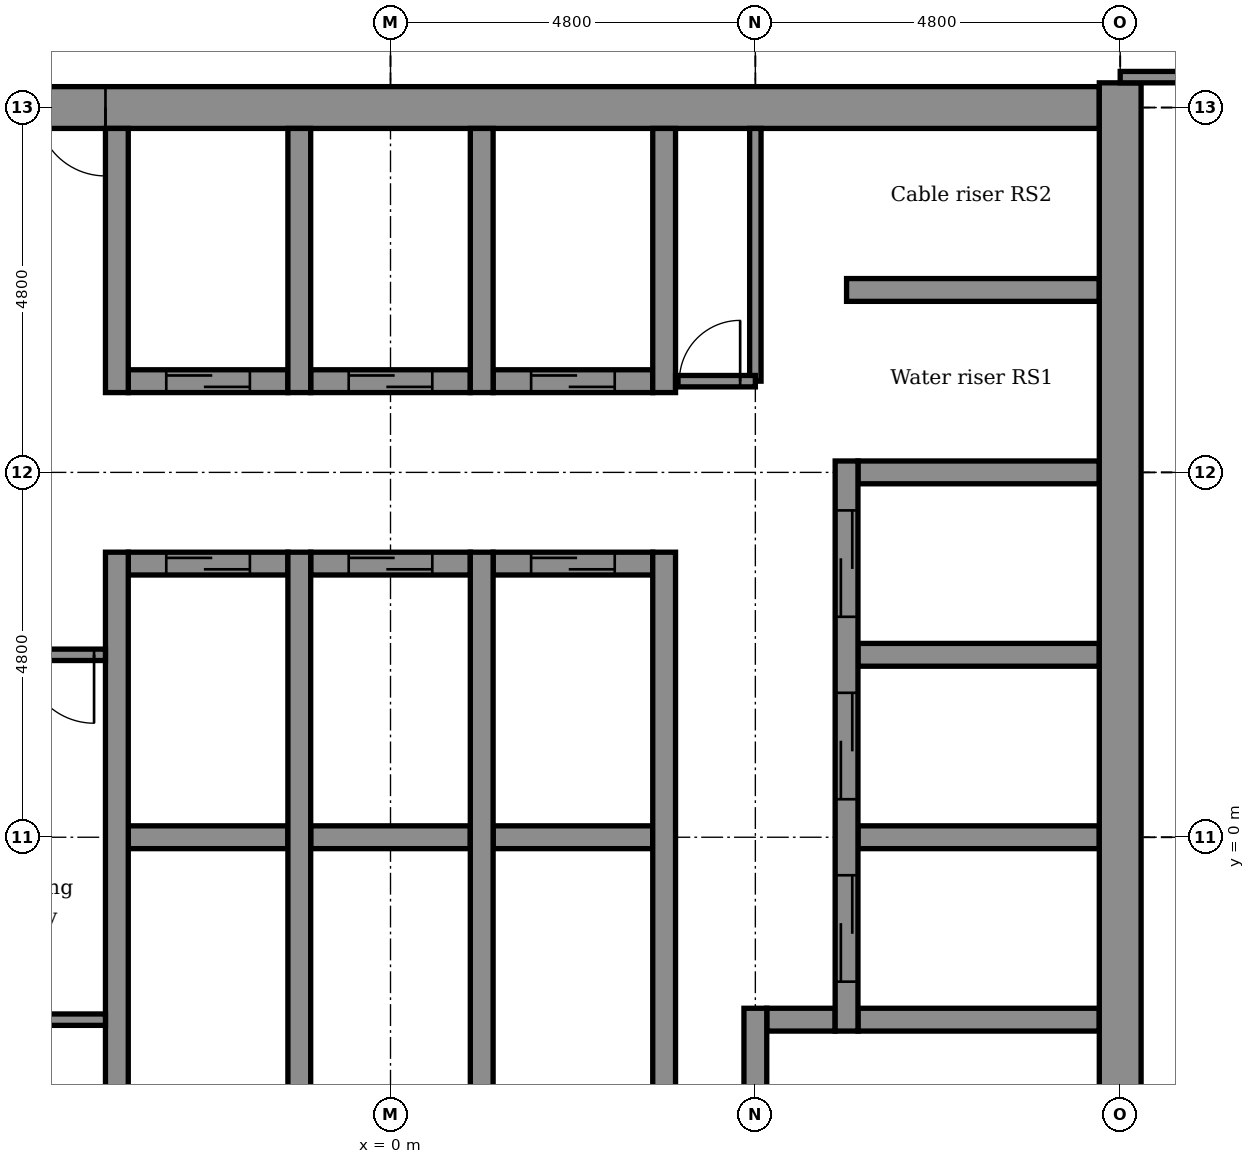
"""IFC4 building model, lengths in metres.
Left out: names, types, materials, properties, quantities, classifications, styles, units other than length and angle.
Written with IfcOpenShell. Run it as: python <this file> out.ifc"""

import sys

from ifc_helpers import new_model, si_unit, direction, frame, frame_2d, origin, place, context, subcontext, project, spatial, rectangle, extrude, element, fill, save


model = new_model("IFC4")
c1 = context("Model", 3, precision=1e-05, world=origin(), true_north=direction((0.0, 1.0)))
c2 = subcontext(c1, "Body", "Model", "MODEL_VIEW")
j1 = project(units=[si_unit("LENGTHUNIT", "METRE"), si_unit("PLANEANGLEUNIT", "RADIAN")], contexts=[c1])
p1 = place(None, origin())
s1 = spatial("IfcSite", under=j1, at=p1, CompositionType="ELEMENT")
p2 = place(p1, origin())
s2 = spatial("IfcBuilding", under=s1, at=p2, CompositionType="ELEMENT")
p3 = place(p2, frame((0.0, 0.0, 222.8)))
s3 = spatial("IfcBuildingStorey", under=s2, at=p3, CompositionType="ELEMENT", Elevation=222.8)
p4 = place(p3, frame((4.95, -2.4, -0.15), z_axis=(0.0, 0.0, 1.0), x_axis=(1.0, 0.0, 0.0)))
e1 = element("IfcWall", 1, at=p4, inside=s3, PredefinedType="STANDARD", context=c2, shape_type="SweptSolid", body=[
    extrude(rectangle(XDim=0.9, YDim=0.3, at=frame_2d((0.45, 0.0))), origin(), (0.0, 0.0, 1.0), 3.9),
])
p5 = place(p3, frame((6.15, -2.4, -0.15), z_axis=(0.0, 0.0, 1.0), x_axis=(1.0, 0.0, 0.0)))
e2 = element("IfcWall", 2, at=p5, inside=s3, PredefinedType="STANDARD", context=c2, shape_type="SweptSolid", body=[
    extrude(rectangle(XDim=3.175, YDim=0.3, at=frame_2d((1.587, 0.0))), origin(), (0.0, 0.0, 1.0), 3.9),
])
p6 = place(p3, frame((-3.45, 0.0, -0.15), z_axis=(0.0, 0.0, 1.0), x_axis=(1.0, 0.0, 0.0)))
e3 = element("IfcWall", 3, at=p6, inside=s3, PredefinedType="STANDARD", context=c2, shape_type="SweptSolid", body=[
    extrude(rectangle(XDim=2.1, YDim=0.3, at=frame_2d((1.05, 0.0))), origin(), (0.0, 0.0, 1.0), 3.9),
])
p7 = place(p3, frame((-1.05, 0.0, -0.15), z_axis=(0.0, 0.0, 1.0), x_axis=(1.0, 0.0, 0.0)))
e4 = element("IfcWall", 4, at=p7, inside=s3, PredefinedType="STANDARD", context=c2, shape_type="SweptSolid", body=[
    extrude(rectangle(XDim=2.1, YDim=0.3, at=frame_2d((1.05, 0.0))), origin(), (0.0, 0.0, 1.0), 3.9),
])
p8 = place(p3, frame((1.35, 0.0, -0.15), z_axis=(0.0, 0.0, 1.0), x_axis=(1.0, 0.0, 0.0)))
e5 = element("IfcWall", 5, at=p8, inside=s3, PredefinedType="STANDARD", context=c2, shape_type="SweptSolid", body=[
    extrude(rectangle(XDim=2.1, YDim=0.3, at=frame_2d((1.05, 0.0))), origin(), (0.0, 0.0, 1.0), 3.9),
])
for number, where, z_axis, x_axis in (
    (6, (6.15, 0.0, -0.15), (0.0, 0.0, 1.0), (1.0, 0.0, 0.0)),
    (7, (6.15, 2.4, -0.15), (0.0, 0.0, 1.0), (1.0, 0.0, 0.0)),
):
    element("IfcWall", number, at=place(p3, frame(where, z_axis=z_axis, x_axis=x_axis)), inside=s3, PredefinedType="STANDARD", context=c2, shape_type="SweptSolid", body=[
        extrude(rectangle(XDim=3.175, YDim=0.3, at=frame_2d((1.587, 0.0))), origin(), (0.0, 0.0, 1.0), 3.9),
    ])
p9 = place(p3, frame((-3.45, 3.6, -0.15), z_axis=(0.0, 0.0, 1.0), x_axis=(1.0, 0.0, 0.0)))
e8 = element("IfcWall", 8, at=p9, inside=s3, PredefinedType="STANDARD", context=c2, shape_type="SweptSolid", body=[
    extrude(rectangle(XDim=2.1, YDim=0.3, at=frame_2d((1.05, 0.0))), origin(), (0.0, 0.0, 1.0), 3.9),
])
p10 = place(p9, frame((0.5, 0.0, 0.15)))
e9 = element("IfcOpeningElement", 9, at=p10, cuts=e8, PredefinedType="OPENING", context=c2, shape_type="SweptSolid", body=[
    extrude(rectangle(XDim=1.1, YDim=2.1, at=frame_2d((0.55, 1.05))), frame((0.0, 0.16, 0.0), z_axis=(0.0, -1.0, 0.0), x_axis=(1.0, 0.0, 0.0)), (0.0, 0.0, 1.0), 0.32),
])
p11 = place(p3, frame((-1.05, 3.6, -0.15), z_axis=(0.0, 0.0, 1.0), x_axis=(1.0, 0.0, 0.0)))
e10 = element("IfcWall", 10, at=p11, inside=s3, PredefinedType="STANDARD", context=c2, shape_type="SweptSolid", body=[
    extrude(rectangle(XDim=2.1, YDim=0.3, at=frame_2d((1.05, 0.0))), origin(), (0.0, 0.0, 1.0), 3.9),
])
p12 = place(p11, frame((0.5, 0.0, 0.15)))
e11 = element("IfcOpeningElement", 11, at=p12, cuts=e10, PredefinedType="OPENING", context=c2, shape_type="SweptSolid", body=[
    extrude(rectangle(XDim=1.1, YDim=2.1, at=frame_2d((0.55, 1.05))), frame((0.0, 0.16, 0.0), z_axis=(0.0, -1.0, 0.0), x_axis=(1.0, 0.0, 0.0)), (0.0, 0.0, 1.0), 0.32),
])
p13 = place(p3, frame((1.35, 3.6, -0.15), z_axis=(0.0, 0.0, 1.0), x_axis=(1.0, 0.0, 0.0)))
e12 = element("IfcWall", 12, at=p13, inside=s3, PredefinedType="STANDARD", context=c2, shape_type="SweptSolid", body=[
    extrude(rectangle(XDim=2.1, YDim=0.3, at=frame_2d((1.05, 0.0))), origin(), (0.0, 0.0, 1.0), 3.9),
])
p14 = place(p13, frame((0.5, 0.0, 0.15)))
e13 = element("IfcOpeningElement", 13, at=p14, cuts=e12, PredefinedType="OPENING", context=c2, shape_type="SweptSolid", body=[
    extrude(rectangle(XDim=1.1, YDim=2.1, at=frame_2d((0.55, 1.05))), frame((0.0, 0.16, 0.0), z_axis=(0.0, -1.0, 0.0), x_axis=(1.0, 0.0, 0.0)), (0.0, 0.0, 1.0), 0.32),
])
p15 = place(p3, frame((6.15, 4.8, -0.15), z_axis=(0.0, 0.0, 1.0), x_axis=(1.0, 0.0, 0.0)))
e14 = element("IfcWall", 14, at=p15, inside=s3, PredefinedType="STANDARD", context=c2, shape_type="SweptSolid", body=[
    extrude(rectangle(XDim=3.175, YDim=0.3, at=frame_2d((1.587, 0.0))), origin(), (0.0, 0.0, 1.0), 3.9),
])
p16 = place(p3, frame((-3.45, 6.0, -0.15), z_axis=(0.0, 0.0, 1.0), x_axis=(1.0, 0.0, 0.0)))
e15 = element("IfcWall", 15, at=p16, inside=s3, PredefinedType="STANDARD", context=c2, shape_type="SweptSolid", body=[
    extrude(rectangle(XDim=2.1, YDim=0.3, at=frame_2d((1.05, 0.0))), origin(), (0.0, 0.0, 1.0), 3.9),
])
p17 = place(p16, frame((0.5, 0.0, 0.15)))
e16 = element("IfcOpeningElement", 16, at=p17, cuts=e15, PredefinedType="OPENING", context=c2, shape_type="SweptSolid", body=[
    extrude(rectangle(XDim=1.1, YDim=2.1, at=frame_2d((0.55, 1.05))), frame((0.0, 0.16, 0.0), z_axis=(0.0, -1.0, 0.0), x_axis=(1.0, 0.0, 0.0)), (0.0, 0.0, 1.0), 0.32),
])
p18 = place(p3, frame((-1.05, 6.0, -0.15), z_axis=(0.0, 0.0, 1.0), x_axis=(1.0, 0.0, 0.0)))
e17 = element("IfcWall", 17, at=p18, inside=s3, PredefinedType="STANDARD", context=c2, shape_type="SweptSolid", body=[
    extrude(rectangle(XDim=2.1, YDim=0.3, at=frame_2d((1.05, 0.0))), origin(), (0.0, 0.0, 1.0), 3.9),
])
p19 = place(p18, frame((0.5, 0.0, 0.15)))
e18 = element("IfcOpeningElement", 18, at=p19, cuts=e17, PredefinedType="OPENING", context=c2, shape_type="SweptSolid", body=[
    extrude(rectangle(XDim=1.1, YDim=2.1, at=frame_2d((0.55, 1.05))), frame((0.0, 0.16, 0.0), z_axis=(0.0, -1.0, 0.0), x_axis=(1.0, 0.0, 0.0)), (0.0, 0.0, 1.0), 0.32),
])
p20 = place(p3, frame((1.35, 6.0, -0.15), z_axis=(0.0, 0.0, 1.0), x_axis=(1.0, 0.0, 0.0)))
e19 = element("IfcWall", 19, at=p20, inside=s3, PredefinedType="STANDARD", context=c2, shape_type="SweptSolid", body=[
    extrude(rectangle(XDim=2.1, YDim=0.3, at=frame_2d((1.05, 0.0))), origin(), (0.0, 0.0, 1.0), 3.9),
])
p21 = place(p20, frame((0.5, 0.0, 0.15)))
e20 = element("IfcOpeningElement", 20, at=p21, cuts=e19, PredefinedType="OPENING", context=c2, shape_type="SweptSolid", body=[
    extrude(rectangle(XDim=1.1, YDim=2.1, at=frame_2d((0.55, 1.05))), frame((0.0, 0.16, 0.0), z_axis=(0.0, -1.0, 0.0), x_axis=(1.0, 0.0, 0.0)), (0.0, 0.0, 1.0), 0.32),
])
p22 = place(p3, frame((6.0, 7.2, -0.15), z_axis=(0.0, 0.0, 1.0), x_axis=(1.0, 0.0, 0.0)))
e21 = element("IfcWall", 21, at=p22, inside=s3, PredefinedType="STANDARD", context=c2, shape_type="SweptSolid", body=[
    extrude(rectangle(XDim=3.325, YDim=0.3, at=frame_2d((1.663, 0.0))), origin(), (0.0, 0.0, 1.0), 3.9),
])
p23 = place(p3, frame((-5.25, 9.6, -0.15), z_axis=(0.0, 0.0, 1.0), x_axis=(1.0, 0.0, 0.0)))
e22 = element("IfcWall", 22, at=p23, inside=s3, PredefinedType="SHEAR", context=c2, shape_type="SweptSolid", body=[
    extrude(rectangle(XDim=14.575, YDim=0.55, at=frame_2d((7.288, 0.0))), origin(), (0.0, 0.0, 1.0), 3.9),
])
p24 = place(p23, frame((0.6, 0.0, 0.15)))
e23 = element("IfcOpeningElement", 23, at=p24, cuts=e22, PredefinedType="OPENING", context=c2, shape_type="SweptSolid", body=[
    extrude(rectangle(XDim=0.9, YDim=2.1, at=frame_2d((0.45, 1.05))), frame((0.0, 0.285, 0.0), z_axis=(0.0, -1.0, 0.0), x_axis=(1.0, 0.0, 0.0)), (0.0, 0.0, 1.0), 0.57),
])
p25 = place(p3, frame((-3.6, -3.75, -0.15), z_axis=(0.0, 0.0, 1.0), x_axis=(0.0, 1.0, 0.0)))
e24 = element("IfcWall", 24, at=p25, inside=s3, PredefinedType="STANDARD", context=c2, shape_type="SweptSolid", body=[
    extrude(rectangle(XDim=7.5, YDim=0.3, at=frame_2d((3.75, 0.0))), origin(), (0.0, 0.0, 1.0), 3.9),
])
p26 = place(p3, frame((-3.6, 5.85, -0.15), z_axis=(0.0, 0.0, 1.0), x_axis=(0.0, 1.0, 0.0)))
e25 = element("IfcWall", 25, at=p26, inside=s3, PredefinedType="STANDARD", context=c2, shape_type="SweptSolid", body=[
    extrude(rectangle(XDim=3.475, YDim=0.3, at=frame_2d((1.737, 0.0))), origin(), (0.0, 0.0, 1.0), 3.9),
])
p27 = place(p3, frame((-1.2, -3.75, -0.15), z_axis=(0.0, 0.0, 1.0), x_axis=(0.0, 1.0, 0.0)))
e26 = element("IfcWall", 26, at=p27, inside=s3, PredefinedType="STANDARD", context=c2, shape_type="SweptSolid", body=[
    extrude(rectangle(XDim=7.5, YDim=0.3, at=frame_2d((3.75, 0.0))), origin(), (0.0, 0.0, 1.0), 3.9),
])
p28 = place(p3, frame((-1.2, 5.85, -0.15), z_axis=(0.0, 0.0, 1.0), x_axis=(0.0, 1.0, 0.0)))
e27 = element("IfcWall", 27, at=p28, inside=s3, PredefinedType="STANDARD", context=c2, shape_type="SweptSolid", body=[
    extrude(rectangle(XDim=3.475, YDim=0.3, at=frame_2d((1.737, 0.0))), origin(), (0.0, 0.0, 1.0), 3.9),
])
p29 = place(p3, frame((1.2, -3.75, -0.15), z_axis=(0.0, 0.0, 1.0), x_axis=(0.0, 1.0, 0.0)))
e28 = element("IfcWall", 28, at=p29, inside=s3, PredefinedType="STANDARD", context=c2, shape_type="SweptSolid", body=[
    extrude(rectangle(XDim=7.5, YDim=0.3, at=frame_2d((3.75, 0.0))), origin(), (0.0, 0.0, 1.0), 3.9),
])
p30 = place(p3, frame((1.2, 5.85, -0.15), z_axis=(0.0, 0.0, 1.0), x_axis=(0.0, 1.0, 0.0)))
e29 = element("IfcWall", 29, at=p30, inside=s3, PredefinedType="STANDARD", context=c2, shape_type="SweptSolid", body=[
    extrude(rectangle(XDim=3.475, YDim=0.3, at=frame_2d((1.737, 0.0))), origin(), (0.0, 0.0, 1.0), 3.9),
])
p31 = place(p3, frame((3.6, -3.75, -0.15), z_axis=(0.0, 0.0, 1.0), x_axis=(0.0, 1.0, 0.0)))
e30 = element("IfcWall", 30, at=p31, inside=s3, PredefinedType="STANDARD", context=c2, shape_type="SweptSolid", body=[
    extrude(rectangle(XDim=7.5, YDim=0.3, at=frame_2d((3.75, 0.0))), origin(), (0.0, 0.0, 1.0), 3.9),
])
p32 = place(p3, frame((3.6, 5.85, -0.15), z_axis=(0.0, 0.0, 1.0), x_axis=(0.0, 1.0, 0.0)))
e31 = element("IfcWall", 31, at=p32, inside=s3, PredefinedType="STANDARD", context=c2, shape_type="SweptSolid", body=[
    extrude(rectangle(XDim=3.475, YDim=0.3, at=frame_2d((1.737, 0.0))), origin(), (0.0, 0.0, 1.0), 3.9),
])
p33 = place(p3, frame((4.8, -9.325, -0.15), z_axis=(0.0, 0.0, 1.0), x_axis=(0.0, 1.0, 0.0)))
e32 = element("IfcWall", 32, at=p33, inside=s3, PredefinedType="STANDARD", context=c2, shape_type="SweptSolid", body=[
    extrude(rectangle(XDim=7.075, YDim=0.3, at=frame_2d((3.538, 0.0))), origin(), (0.0, 0.0, 1.0), 3.9),
])
p34 = place(p33, frame((3.875, 0.0, 0.15)))
e33 = element("IfcOpeningElement", 33, at=p34, cuts=e32, PredefinedType="OPENING", context=c2, shape_type="SweptSolid", body=[
    extrude(rectangle(XDim=1.2, YDim=2.1, at=frame_2d((0.6, 1.05))), frame((0.0, 0.16, 0.0), z_axis=(0.0, -1.0, 0.0), x_axis=(1.0, 0.0, 0.0)), (0.0, 0.0, 1.0), 0.32),
])
p35 = place(p3, frame((6.0, -2.55, -0.15), z_axis=(0.0, 0.0, 1.0), x_axis=(0.0, 1.0, 0.0)))
e34 = element("IfcWall", 34, at=p35, inside=s3, PredefinedType="STANDARD", context=c2, shape_type="SweptSolid", body=[
    extrude(rectangle(XDim=7.5, YDim=0.3, at=frame_2d((3.75, 0.0))), origin(), (0.0, 0.0, 1.0), 3.9),
])
p36 = place(p35, frame((0.65, 0.0, 0.15)))
e35 = element("IfcOpeningElement", 35, at=p36, cuts=e34, PredefinedType="OPENING", context=c2, shape_type="SweptSolid", body=[
    extrude(rectangle(XDim=1.4, YDim=2.1, at=frame_2d((0.7, 1.05))), frame((0.0, 0.16, 0.0), z_axis=(0.0, -1.0, 0.0), x_axis=(1.0, 0.0, 0.0)), (0.0, 0.0, 1.0), 0.32),
])
p37 = place(p35, frame((3.05, 0.0, 0.15)))
e36 = element("IfcOpeningElement", 36, at=p37, cuts=e34, PredefinedType="OPENING", context=c2, shape_type="SweptSolid", body=[
    extrude(rectangle(XDim=1.4, YDim=2.1, at=frame_2d((0.7, 1.05))), frame((0.0, 0.16, 0.0), z_axis=(0.0, -1.0, 0.0), x_axis=(1.0, 0.0, 0.0)), (0.0, 0.0, 1.0), 0.32),
])
p38 = place(p35, frame((5.45, 0.0, 0.15)))
e37 = element("IfcOpeningElement", 37, at=p38, cuts=e34, PredefinedType="OPENING", context=c2, shape_type="SweptSolid", body=[
    extrude(rectangle(XDim=1.4, YDim=2.1, at=frame_2d((0.7, 1.05))), frame((0.0, 0.16, 0.0), z_axis=(0.0, -1.0, 0.0), x_axis=(1.0, 0.0, 0.0)), (0.0, 0.0, 1.0), 0.32),
])
p39 = place(p3, frame((9.6, -10.15, -0.15), z_axis=(0.0, 0.0, 1.0), x_axis=(0.0, 1.0, 0.0)))
e38 = element("IfcWall", 38, at=p39, inside=s3, PredefinedType="SHEAR", context=c2, shape_type="SweptSolid", body=[
    extrude(rectangle(XDim=20.075, YDim=0.55, at=frame_2d((10.038, 0.0))), origin(), (0.0, 0.0, 1.0), 3.9),
])
p40 = place(p3, frame((4.8, 6.0, 0.0), z_axis=(0.0, 0.0, 1.0), x_axis=(0.0, 1.0, 0.0)))
e39 = element("IfcWall", 39, at=p40, inside=s3, PredefinedType="PARTITIONING", context=c2, shape_type="SweptSolid", body=[
    extrude(rectangle(XDim=3.325, YDim=0.15, at=frame_2d((1.663, 0.0))), origin(), (0.0, 0.0, 1.0), 3.75),
])
p41 = place(p3, frame((3.75, 6.0, 0.0), z_axis=(0.0, 0.0, 1.0), x_axis=(1.0, 0.0, 0.0)))
e40 = element("IfcWall", 40, at=p41, inside=s3, PredefinedType="PARTITIONING", context=c2, shape_type="SweptSolid", body=[
    extrude(rectangle(XDim=1.05, YDim=0.15, at=frame_2d((0.525, 0.0))), origin(), (0.0, 0.0, 1.0), 3.75),
])
p42 = place(p41, frame((0.05, 0.0, 0.0)))
e41 = element("IfcOpeningElement", 41, at=p42, cuts=e40, PredefinedType="OPENING", context=c2, shape_type="SweptSolid", body=[
    extrude(rectangle(XDim=0.8, YDim=2.1, at=frame_2d((0.4, 1.05))), frame((0.0, 0.085, 0.0), z_axis=(0.0, -1.0, 0.0), x_axis=(1.0, 0.0, 0.0)), (0.0, 0.0, 1.0), 0.17),
])
p43 = place(p3, frame((9.6, 10.0, 0.0), z_axis=(0.0, 0.0, 1.0), x_axis=(1.0, 0.0, 0.0)))
e42 = element("IfcWall", 42, at=p43, inside=s3, PredefinedType="PARTITIONING", context=c2, shape_type="SweptSolid", body=[
    extrude(rectangle(XDim=4.955, YDim=0.15, at=frame_2d((2.477, 0.0))), origin(), (0.0, 0.0, 1.0), 3.75),
])
p44 = place(p43, frame((1.916, 0.0, 0.0)))
e43 = element("IfcOpeningElement", 43, at=p44, cuts=e42, PredefinedType="OPENING", context=c2, shape_type="SweptSolid", body=[
    extrude(rectangle(XDim=1.8, YDim=2.1, at=frame_2d((0.9, 1.05))), frame((0.0, 0.085, 0.0), z_axis=(0.0, -1.0, 0.0), x_axis=(1.0, 0.0, 0.0)), (0.0, 0.0, 1.0), 0.17),
])
p45 = place(p3, frame((-4.95, 2.4, 0.0), z_axis=(0.0, 0.0, 1.0), x_axis=(1.0, 0.0, 0.0)))
e44 = element("IfcWall", 44, at=p45, inside=s3, PredefinedType="PARTITIONING", context=c2, shape_type="SweptSolid", body=[
    extrude(rectangle(XDim=1.2, YDim=0.15, at=frame_2d((0.6, 0.0))), origin(), (0.0, 0.0, 1.0), 3.75),
])
p46 = place(p45, frame((0.15, 0.0, 0.0)))
e45 = element("IfcOpeningElement", 45, at=p46, cuts=e44, PredefinedType="OPENING", context=c2, shape_type="SweptSolid", body=[
    extrude(rectangle(XDim=0.9, YDim=2.1, at=frame_2d((0.45, 1.05))), frame((0.0, 0.085, 0.0), z_axis=(0.0, -1.0, 0.0), x_axis=(1.0, 0.0, 0.0)), (0.0, 0.0, 1.0), 0.17),
])
p47 = place(p3, frame((-4.95, -2.4, 0.0), z_axis=(0.0, 0.0, 1.0), x_axis=(1.0, 0.0, 0.0)))
e46 = element("IfcWall", 46, at=p47, inside=s3, PredefinedType="PARTITIONING", context=c2, shape_type="SweptSolid", body=[
    extrude(rectangle(XDim=1.2, YDim=0.15, at=frame_2d((0.6, 0.0))), origin(), (0.0, 0.0, 1.0), 3.75),
])
p48 = place(p42, origin())
e47 = element("IfcDoor", 47, at=p48, inside=s3, OperationType="SINGLE_SWING_RIGHT", PredefinedType="DOOR", context=c2, shape_type="SweptSolid", body=[
    extrude(rectangle(XDim=0.8, YDim=2.1, at=frame_2d((0.4, 1.05))), frame((0.0, 0.025, 0.0), z_axis=(0.0, -1.0, 0.0), x_axis=(1.0, 0.0, 0.0)), (0.0, 0.0, 1.0), 0.05),
])
fill(e41, e47)
p49 = place(p36, origin())
e48 = element("IfcDoor", 48, at=p49, inside=s3, OperationType="DOUBLE_DOOR_SLIDING", PredefinedType="DOOR", context=c2, shape_type="SweptSolid", body=[
    extrude(rectangle(XDim=1.4, YDim=2.1, at=frame_2d((0.7, 1.05))), frame((0.0, 0.025, 0.0), z_axis=(0.0, -1.0, 0.0), x_axis=(1.0, 0.0, 0.0)), (0.0, 0.0, 1.0), 0.05),
])
fill(e35, e48)
p50 = place(p37, origin())
e49 = element("IfcDoor", 49, at=p50, inside=s3, OperationType="DOUBLE_DOOR_SLIDING", PredefinedType="DOOR", context=c2, shape_type="SweptSolid", body=[
    extrude(rectangle(XDim=1.4, YDim=2.1, at=frame_2d((0.7, 1.05))), frame((0.0, 0.025, 0.0), z_axis=(0.0, -1.0, 0.0), x_axis=(1.0, 0.0, 0.0)), (0.0, 0.0, 1.0), 0.05),
])
fill(e36, e49)
p51 = place(p38, origin())
e50 = element("IfcDoor", 50, at=p51, inside=s3, OperationType="DOUBLE_DOOR_SLIDING", PredefinedType="DOOR", context=c2, shape_type="SweptSolid", body=[
    extrude(rectangle(XDim=1.4, YDim=2.1, at=frame_2d((0.7, 1.05))), frame((0.0, 0.025, 0.0), z_axis=(0.0, -1.0, 0.0), x_axis=(1.0, 0.0, 0.0)), (0.0, 0.0, 1.0), 0.05),
])
fill(e37, e50)
p52 = place(p17, origin())
e51 = element("IfcDoor", 51, at=p52, inside=s3, OperationType="DOUBLE_DOOR_SLIDING", PredefinedType="DOOR", context=c2, shape_type="SweptSolid", body=[
    extrude(rectangle(XDim=1.1, YDim=2.1, at=frame_2d((0.55, 1.05))), frame((0.0, 0.025, 0.0), z_axis=(0.0, -1.0, 0.0), x_axis=(1.0, 0.0, 0.0)), (0.0, 0.0, 1.0), 0.05),
])
fill(e16, e51)
p53 = place(p19, origin())
e52 = element("IfcDoor", 52, at=p53, inside=s3, OperationType="DOUBLE_DOOR_SLIDING", PredefinedType="DOOR", context=c2, shape_type="SweptSolid", body=[
    extrude(rectangle(XDim=1.1, YDim=2.1, at=frame_2d((0.55, 1.05))), frame((0.0, 0.025, 0.0), z_axis=(0.0, -1.0, 0.0), x_axis=(1.0, 0.0, 0.0)), (0.0, 0.0, 1.0), 0.05),
])
fill(e18, e52)
p54 = place(p21, origin())
e53 = element("IfcDoor", 53, at=p54, inside=s3, OperationType="DOUBLE_DOOR_SLIDING", PredefinedType="DOOR", context=c2, shape_type="SweptSolid", body=[
    extrude(rectangle(XDim=1.1, YDim=2.1, at=frame_2d((0.55, 1.05))), frame((0.0, 0.025, 0.0), z_axis=(0.0, -1.0, 0.0), x_axis=(1.0, 0.0, 0.0)), (0.0, 0.0, 1.0), 0.05),
])
fill(e20, e53)
p55 = place(p10, origin())
e54 = element("IfcDoor", 54, at=p55, inside=s3, OperationType="DOUBLE_DOOR_SLIDING", PredefinedType="DOOR", context=c2, shape_type="SweptSolid", body=[
    extrude(rectangle(XDim=1.1, YDim=2.1, at=frame_2d((0.55, 1.05))), frame((0.0, 0.025, 0.0), z_axis=(0.0, -1.0, 0.0), x_axis=(1.0, 0.0, 0.0)), (0.0, 0.0, 1.0), 0.05),
])
fill(e9, e54)
p56 = place(p12, origin())
e55 = element("IfcDoor", 55, at=p56, inside=s3, OperationType="DOUBLE_DOOR_SLIDING", PredefinedType="DOOR", context=c2, shape_type="SweptSolid", body=[
    extrude(rectangle(XDim=1.1, YDim=2.1, at=frame_2d((0.55, 1.05))), frame((0.0, 0.025, 0.0), z_axis=(0.0, -1.0, 0.0), x_axis=(1.0, 0.0, 0.0)), (0.0, 0.0, 1.0), 0.05),
])
fill(e11, e55)
p57 = place(p14, origin())
e56 = element("IfcDoor", 56, at=p57, inside=s3, OperationType="DOUBLE_DOOR_SLIDING", PredefinedType="DOOR", context=c2, shape_type="SweptSolid", body=[
    extrude(rectangle(XDim=1.1, YDim=2.1, at=frame_2d((0.55, 1.05))), frame((0.0, 0.025, 0.0), z_axis=(0.0, -1.0, 0.0), x_axis=(1.0, 0.0, 0.0)), (0.0, 0.0, 1.0), 0.05),
])
fill(e13, e56)
p58 = place(p24, frame((0.9, 0.0, 0.0), z_axis=(0.0, 0.0, 1.0), x_axis=(-1.0, 0.0, 0.0)))
e57 = element("IfcDoor", 57, at=p58, inside=s3, OperationType="SINGLE_SWING_RIGHT", PredefinedType="DOOR", context=c2, shape_type="SweptSolid", body=[
    extrude(rectangle(XDim=0.9, YDim=2.1, at=frame_2d((0.45, 1.05))), frame((0.0, 0.025, 0.0), z_axis=(0.0, -1.0, 0.0), x_axis=(1.0, 0.0, 0.0)), (0.0, 0.0, 1.0), 0.05),
])
fill(e23, e57)
p59 = place(p46, frame((0.9, 0.0, 0.0), z_axis=(0.0, 0.0, 1.0), x_axis=(-1.0, 0.0, 0.0)))
e58 = element("IfcDoor", 58, at=p59, inside=s3, OperationType="SINGLE_SWING_RIGHT", PredefinedType="DOOR", context=c2, shape_type="SweptSolid", body=[
    extrude(rectangle(XDim=0.9, YDim=2.1, at=frame_2d((0.45, 1.05))), frame((0.0, 0.025, 0.0), z_axis=(0.0, -1.0, 0.0), x_axis=(1.0, 0.0, 0.0)), (0.0, 0.0, 1.0), 0.05),
])
fill(e45, e58)
save(model, sys.argv[1])
